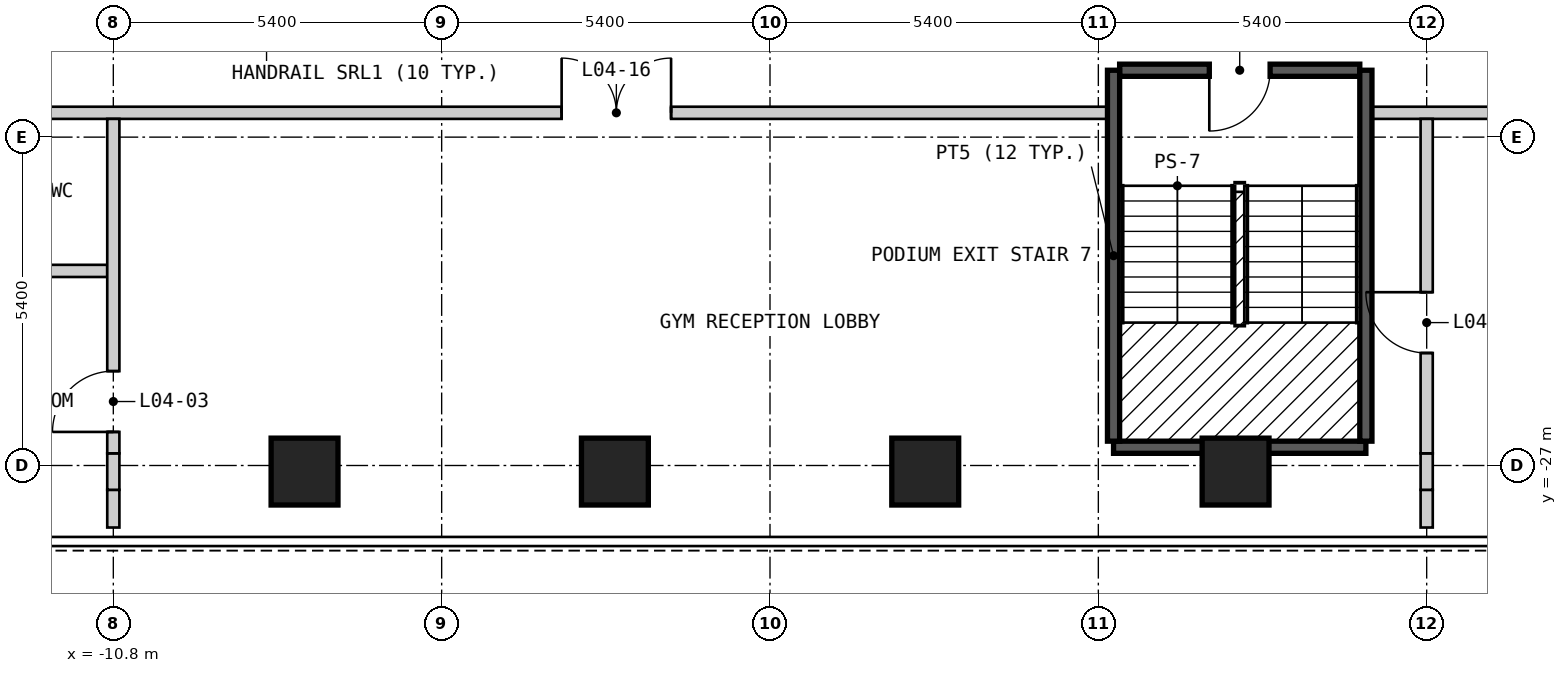
"""IFC4 building model, lengths in metres.
Left out: names, types, materials, properties, quantities, classifications, styles, units other than length and angle.
Written with IfcOpenShell. Run it as: python <this file> out.ifc"""

import sys

from ifc_helpers import new_model, si_unit, direction, frame, frame_2d, origin, origin_2d, place, context, subcontext, project, spatial, rectangle, extrude, element, fill, save


model = new_model("IFC4")
c1 = context("Model", 3, precision=1e-05, world=origin(), true_north=direction((0.0, 1.0)))
c2 = subcontext(c1, "Body", "Model", "MODEL_VIEW")
j1 = project(units=[si_unit("LENGTHUNIT", "METRE"), si_unit("PLANEANGLEUNIT", "RADIAN")], contexts=[c1])
p1 = place(None, origin())
s1 = spatial("IfcSite", under=j1, at=p1, CompositionType="ELEMENT")
p2 = place(p1, origin())
s2 = spatial("IfcBuilding", under=s1, at=p2, CompositionType="ELEMENT")
p3 = place(p2, frame((0.0, 0.0, 16.2)))
s3 = spatial("IfcBuildingStorey", under=s2, at=p3, CompositionType="ELEMENT", Elevation=16.2)
for number, where, z_axis, x_axis in (
    (1, (-7.655, -27.1, 0.0), (0.0, 0.0, 1.0), (1.0, 0.0, 0.0)),
    (2, (-2.551, -27.1, 0.0), (0.0, 0.0, 1.0), (1.0, 0.0, 0.0)),
    (3, (2.553, -27.1, 0.0), (0.0, 0.0, 1.0), (1.0, 0.0, 0.0)),
    (4, (7.657, -27.1, 0.0), (0.0, 0.0, 1.0), (1.0, 0.0, 0.0)),
):
    element("IfcColumn", number, at=place(p3, frame(where, z_axis=z_axis, x_axis=x_axis)), inside=s3, PredefinedType="COLUMN", context=c2, shape_type="SweptSolid", body=[
        extrude(rectangle(XDim=1.1, YDim=1.1, at=origin_2d()), origin(), (0.0, 0.0, 1.0), 3.6),
    ])
p4 = place(p3, frame((5.65, -26.7, 0.0), z_axis=(0.0, 0.0, 1.0), x_axis=(1.0, 0.0, 0.0)))
e5 = element("IfcWall", 5, at=p4, inside=s3, PredefinedType="SOLIDWALL", context=c2, shape_type="SweptSolid", body=[
    extrude(rectangle(XDim=4.15, YDim=0.2, at=frame_2d((2.075, 0.0))), origin(), (0.0, 0.0, 1.0), 3.25),
])
p5 = place(p3, frame((-14.5, -23.8, 0.0), z_axis=(0.0, 0.0, 1.0), x_axis=(1.0, 0.0, 0.0)))
e6 = element("IfcWall", 6, at=p5, inside=s3, PredefinedType="PARTITIONING", context=c2, shape_type="SweptSolid", body=[
    extrude(rectangle(XDim=3.6, YDim=0.2, at=frame_2d((1.8, 0.0))), origin(), (0.0, 0.0, 1.0), 3.25),
])
p6 = place(p3, frame((-18.35, -21.2, 0.0), z_axis=(0.0, 0.0, 1.0), x_axis=(1.0, 0.0, 0.0)))
e7 = element("IfcWall", 7, at=p6, inside=s3, PredefinedType="PARTITIONING", context=c2, shape_type="SweptSolid", body=[
    extrude(rectangle(XDim=24.1, YDim=0.2, at=frame_2d((12.05, 0.0))), origin(), (0.0, 0.0, 1.0), 3.25),
])
p7 = place(p6, frame((2.277, 0.0, 0.0), z_axis=(0.0, 0.0, 1.0), x_axis=(-1.0, 0.0, 0.0)))
e8 = element("IfcOpeningElement", 8, at=p7, cuts=e7, PredefinedType="OPENING", context=c2, shape_type="SweptSolid", body=[
    extrude(rectangle(XDim=0.9, YDim=2.1, at=frame_2d((0.45, 1.05))), frame((0.0, 0.11, 0.0), z_axis=(0.0, -1.0, 0.0), x_axis=(1.0, 0.0, 0.0)), (0.0, 0.0, 1.0), 0.22),
])
p8 = place(p6, frame((6.15, 0.0, 0.0), z_axis=(0.0, 0.0, 1.0), x_axis=(-1.0, 0.0, 0.0)))
e9 = element("IfcOpeningElement", 9, at=p8, cuts=e7, PredefinedType="OPENING", context=c2, shape_type="SweptSolid", body=[
    extrude(rectangle(XDim=1.0, YDim=2.1, at=frame_2d((0.5, 1.05))), frame((0.0, 0.11, 0.0), z_axis=(0.0, -1.0, 0.0), x_axis=(1.0, 0.0, 0.0)), (0.0, 0.0, 1.0), 0.22),
])
p9 = place(p6, frame((14.923, 0.0, 0.0)))
e10 = element("IfcOpeningElement", 10, at=p9, cuts=e7, PredefinedType="OPENING", context=c2, shape_type="SweptSolid", body=[
    extrude(rectangle(XDim=1.8, YDim=2.1, at=frame_2d((0.9, 1.05))), frame((0.0, 0.11, 0.0), z_axis=(0.0, -1.0, 0.0), x_axis=(1.0, 0.0, 0.0)), (0.0, 0.0, 1.0), 0.22),
])
p10 = place(p3, frame((9.7, -21.2, 0.0), z_axis=(0.0, 0.0, 1.0), x_axis=(1.0, 0.0, 0.0)))
e11 = element("IfcWall", 11, at=p10, inside=s3, PredefinedType="PARTITIONING", context=c2, shape_type="SweptSolid", body=[
    extrude(rectangle(XDim=5.7, YDim=0.2, at=frame_2d((2.85, 0.0))), origin(), (0.0, 0.0, 1.0), 3.25),
])
p11 = place(p3, frame((5.75, -20.5, 0.0), z_axis=(0.0, 0.0, 1.0), x_axis=(1.0, 0.0, 0.0)))
e12 = element("IfcWall", 12, at=p11, inside=s3, PredefinedType="SOLIDWALL", context=c2, shape_type="SweptSolid", body=[
    extrude(rectangle(XDim=3.95, YDim=0.2, at=frame_2d((1.975, 0.0))), origin(), (0.0, 0.0, 1.0), 3.25),
])
p12 = place(p11, frame((2.475, 0.0, 0.0), z_axis=(0.0, 0.0, 1.0), x_axis=(-1.0, 0.0, 0.0)))
e13 = element("IfcOpeningElement", 13, at=p12, cuts=e12, PredefinedType="OPENING", context=c2, shape_type="SweptSolid", body=[
    extrude(rectangle(XDim=1.0, YDim=2.1, at=frame_2d((0.5, 1.05))), frame((0.0, 0.11, 0.0), z_axis=(0.0, -1.0, 0.0), x_axis=(1.0, 0.0, 0.0)), (0.0, 0.0, 1.0), 0.22),
])
p13 = place(p3, frame((-10.8, -28.02, 0.0), z_axis=(0.0, 0.0, 1.0), x_axis=(0.0, 1.0, 0.0)))
e14 = element("IfcWall", 14, at=p13, inside=s3, PredefinedType="PARTITIONING", context=c2, shape_type="SweptSolid", body=[
    extrude(rectangle(XDim=0.62, YDim=0.2, at=frame_2d((0.31, 0.0))), origin(), (0.0, 0.0, 1.0), 3.25),
])
p14 = place(p3, frame((-10.8, -27.4, 0.0), z_axis=(0.0, 0.0, 1.0), x_axis=(0.0, 1.0, 0.0)))
e15 = element("IfcWall", 15, at=p14, inside=s3, PredefinedType="PARTITIONING", context=c2, shape_type="SweptSolid", body=[
    extrude(rectangle(XDim=0.6, YDim=0.2, at=frame_2d((0.3, 0.0))), origin(), (0.0, 0.0, 1.0), 2.52),
])
p15 = place(p3, frame((-10.8, -26.8, 0.0), z_axis=(0.0, 0.0, 1.0), x_axis=(0.0, 1.0, 0.0)))
e16 = element("IfcWall", 16, at=p15, inside=s3, PredefinedType="PARTITIONING", context=c2, shape_type="SweptSolid", body=[
    extrude(rectangle(XDim=5.5, YDim=0.2, at=frame_2d((2.75, 0.0))), origin(), (0.0, 0.0, 1.0), 3.25),
])
p16 = place(p15, frame((0.352, 0.0, 0.0)))
e17 = element("IfcOpeningElement", 17, at=p16, cuts=e16, PredefinedType="OPENING", context=c2, shape_type="SweptSolid", body=[
    extrude(rectangle(XDim=1.0, YDim=2.1, at=frame_2d((0.5, 1.05))), frame((0.0, 0.11, 0.0), z_axis=(0.0, -1.0, 0.0), x_axis=(1.0, 0.0, 0.0)), (0.0, 0.0, 1.0), 0.22),
])
for number, where, z_axis, x_axis in (
    (18, (5.65, -26.6, 0.0), (0.0, 0.0, 1.0), (0.0, 1.0, 0.0)),
    (19, (9.8, -26.6, 0.0), (0.0, 0.0, 1.0), (0.0, 1.0, 0.0)),
):
    element("IfcWall", number, at=place(p3, frame(where, z_axis=z_axis, x_axis=x_axis)), inside=s3, PredefinedType="SOLIDWALL", context=c2, shape_type="SweptSolid", body=[
        extrude(rectangle(XDim=6.1, YDim=0.2, at=frame_2d((3.05, 0.0))), origin(), (0.0, 0.0, 1.0), 3.25),
    ])
p17 = place(p3, frame((10.8, -28.02, 0.0), z_axis=(0.0, 0.0, 1.0), x_axis=(0.0, 1.0, 0.0)))
e20 = element("IfcWall", 20, at=p17, inside=s3, PredefinedType="PARTITIONING", context=c2, shape_type="SweptSolid", body=[
    extrude(rectangle(XDim=0.62, YDim=0.2, at=frame_2d((0.31, 0.0))), origin(), (0.0, 0.0, 1.0), 3.25),
])
p18 = place(p3, frame((10.8, -27.4, 0.0), z_axis=(0.0, 0.0, 1.0), x_axis=(0.0, 1.0, 0.0)))
e21 = element("IfcWall", 21, at=p18, inside=s3, PredefinedType="PARTITIONING", context=c2, shape_type="SweptSolid", body=[
    extrude(rectangle(XDim=0.6, YDim=0.2, at=frame_2d((0.3, 0.0))), origin(), (0.0, 0.0, 1.0), 2.52),
])
p19 = place(p3, frame((10.8, -26.8, 0.0), z_axis=(0.0, 0.0, 1.0), x_axis=(0.0, 1.0, 0.0)))
e22 = element("IfcWall", 22, at=p19, inside=s3, PredefinedType="PARTITIONING", context=c2, shape_type="SweptSolid", body=[
    extrude(rectangle(XDim=5.5, YDim=0.2, at=frame_2d((2.75, 0.0))), origin(), (0.0, 0.0, 1.0), 3.25),
])
p20 = place(p19, frame((2.65, 0.0, 0.0), z_axis=(0.0, 0.0, 1.0), x_axis=(-1.0, 0.0, 0.0)))
e23 = element("IfcOpeningElement", 23, at=p20, cuts=e22, PredefinedType="OPENING", context=c2, shape_type="SweptSolid", body=[
    extrude(rectangle(XDim=1.0, YDim=2.1, at=frame_2d((0.5, 1.05))), frame((0.0, 0.11, 0.0), z_axis=(0.0, -1.0, 0.0), x_axis=(1.0, 0.0, 0.0)), (0.0, 0.0, 1.0), 0.22),
])
p21 = place(p16, origin())
e24 = element("IfcDoor", 24, at=p21, inside=s3, OperationType="SINGLE_SWING_LEFT", PredefinedType="DOOR", context=c2, shape_type="SweptSolid", body=[
    extrude(rectangle(XDim=1.0, YDim=2.1, at=frame_2d((0.5, 1.05))), frame((0.0, 0.025, 0.0), z_axis=(0.0, -1.0, 0.0), x_axis=(1.0, 0.0, 0.0)), (0.0, 0.0, 1.0), 0.05),
])
fill(e17, e24)
p22 = place(p20, origin())
e25 = element("IfcDoor", 25, at=p22, inside=s3, OperationType="SINGLE_SWING_LEFT", PredefinedType="DOOR", context=c2, shape_type="SweptSolid", body=[
    extrude(rectangle(XDim=1.0, YDim=2.1, at=frame_2d((0.5, 1.05))), frame((0.0, 0.025, 0.0), z_axis=(0.0, -1.0, 0.0), x_axis=(1.0, 0.0, 0.0)), (0.0, 0.0, 1.0), 0.05),
])
fill(e23, e25)
p23 = place(p12, origin())
e26 = element("IfcDoor", 26, at=p23, inside=s3, OperationType="SINGLE_SWING_RIGHT", PredefinedType="DOOR", context=c2, shape_type="SweptSolid", body=[
    extrude(rectangle(XDim=1.0, YDim=2.1, at=frame_2d((0.5, 1.05))), frame((0.0, 0.025, 0.0), z_axis=(0.0, -1.0, 0.0), x_axis=(1.0, 0.0, 0.0)), (0.0, 0.0, 1.0), 0.05),
])
fill(e13, e26)
p24 = place(p9, origin())
e27 = element("IfcDoor", 27, at=p24, inside=s3, OperationType="DOUBLE_DOOR_SINGLE_SWING", PredefinedType="DOOR", context=c2, shape_type="SweptSolid", body=[
    extrude(rectangle(XDim=1.8, YDim=2.1, at=frame_2d((0.9, 1.05))), frame((0.0, 0.025, 0.0), z_axis=(0.0, -1.0, 0.0), x_axis=(1.0, 0.0, 0.0)), (0.0, 0.0, 1.0), 0.05),
])
fill(e10, e27)
save(model, sys.argv[1])
